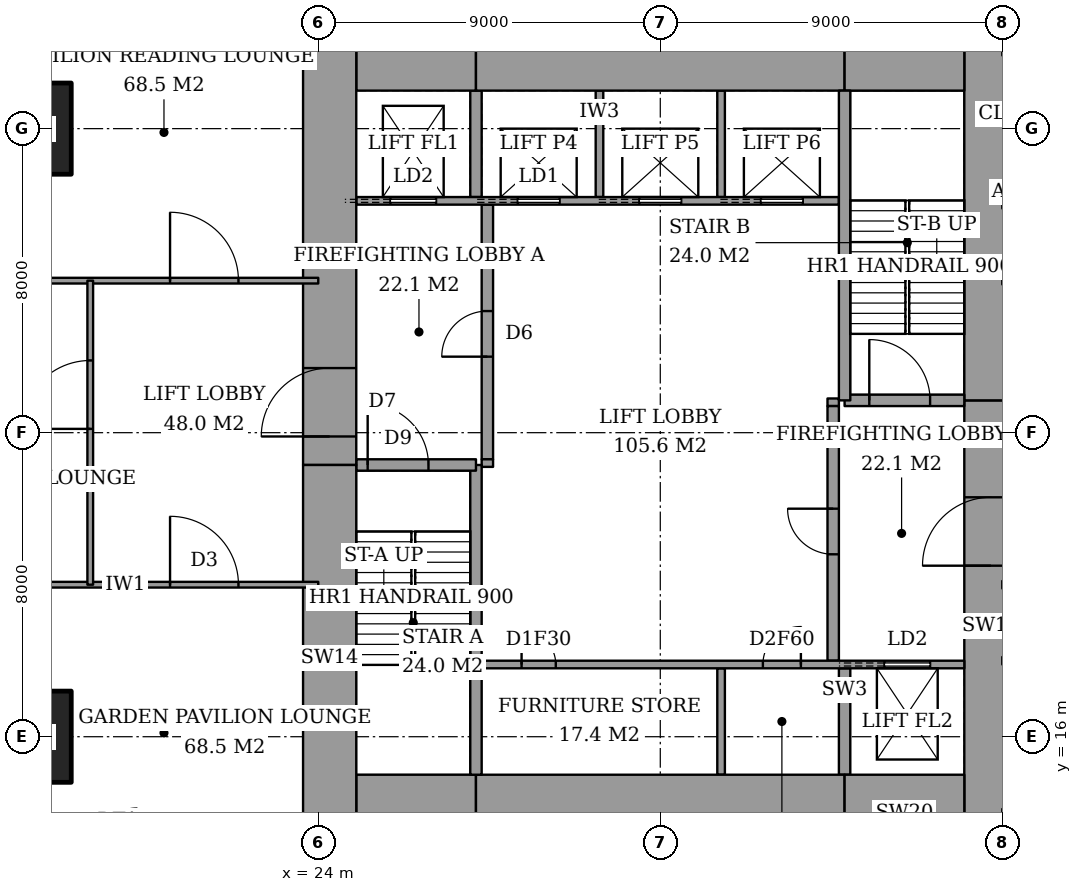
"""IFC4 building model, lengths in metres.
Left out: names, types, materials, properties, quantities, classifications, styles, units other than length and angle.
Written with IfcOpenShell. Run it as: python <this file> out.ifc"""

import sys

from ifc_helpers import new_model, si_unit, direction, frame, frame_2d, origin, origin_2d, place, context, subcontext, project, spatial, rectangle, extrude, element, fill, save


model = new_model("IFC4")
c1 = context("Model", 3, precision=1e-05, world=origin(), true_north=direction((0.0, 1.0)))
c2 = subcontext(c1, "Body", "Model", "MODEL_VIEW")
j1 = project(units=[si_unit("LENGTHUNIT", "METRE"), si_unit("PLANEANGLEUNIT", "RADIAN")], contexts=[c1])
p1 = place(None, origin())
s1 = spatial("IfcSite", under=j1, at=p1, CompositionType="ELEMENT")
p2 = place(p1, origin())
s2 = spatial("IfcBuilding", under=s1, at=p2, CompositionType="ELEMENT")
p3 = place(p2, frame((0.0, 0.0, 225.4)))
s3 = spatial("IfcBuildingStorey", under=s2, at=p3, CompositionType="ELEMENT", Elevation=225.4)
for number, where, z_axis, x_axis in (
    (1, (16.0, 16.0, 0.0), (0.0, 0.0, 1.0), (1.0, 0.0, 0.0)),
    (2, (16.0, 32.0, 0.0), (0.0, 0.0, 1.0), (1.0, 0.0, 0.0)),
):
    element("IfcColumn", number, at=place(p3, frame(where, z_axis=z_axis, x_axis=x_axis)), inside=s3, PredefinedType="COLUMN", context=c2, shape_type="SweptSolid", body=[
        extrude(rectangle(XDim=3.0, YDim=2.4, at=origin_2d()), origin(), (0.0, 0.0, 1.0), 5.0),
    ])
p4 = place(p3, frame((25.0, 14.0, 0.0), z_axis=(0.0, 0.0, 1.0), x_axis=(1.0, 0.0, 0.0)))
e3 = element("IfcWall", 3, at=p4, inside=s3, PredefinedType="SHEAR", context=c2, shape_type="SweptSolid", body=[
    extrude(rectangle(XDim=3.15, YDim=2.0, at=frame_2d((1.575, 0.0))), origin(), (0.0, 0.0, 1.0), 5.0),
])
p5 = place(p3, frame((28.15, 14.0, 0.0), z_axis=(0.0, 0.0, 1.0), x_axis=(1.0, 0.0, 0.0)))
e4 = element("IfcWall", 4, at=p5, inside=s3, PredefinedType="SHEAR", context=c2, shape_type="SweptSolid", body=[
    extrude(rectangle(XDim=9.7, YDim=2.0, at=frame_2d((4.85, 0.0))), origin(), (0.0, 0.0, 1.0), 5.0),
])
for number, where, z_axis, x_axis in (
    (5, (37.85, 14.0, 0.0), (0.0, 0.0, 1.0), (1.0, 0.0, 0.0)),
    (6, (25.0, 34.0, 0.0), (0.0, 0.0, 1.0), (1.0, 0.0, 0.0)),
):
    element("IfcWall", number, at=place(p3, frame(where, z_axis=z_axis, x_axis=x_axis)), inside=s3, PredefinedType="SHEAR", context=c2, shape_type="SweptSolid", body=[
        extrude(rectangle(XDim=3.15, YDim=2.0, at=frame_2d((1.575, 0.0))), origin(), (0.0, 0.0, 1.0), 5.0),
    ])
p6 = place(p3, frame((28.15, 34.0, 0.0), z_axis=(0.0, 0.0, 1.0), x_axis=(1.0, 0.0, 0.0)))
e7 = element("IfcWall", 7, at=p6, inside=s3, PredefinedType="SHEAR", context=c2, shape_type="SweptSolid", body=[
    extrude(rectangle(XDim=9.7, YDim=2.0, at=frame_2d((4.85, 0.0))), origin(), (0.0, 0.0, 1.0), 5.0),
])
p7 = place(p3, frame((37.85, 34.0, 0.0), z_axis=(0.0, 0.0, 1.0), x_axis=(1.0, 0.0, 0.0)))
e8 = element("IfcWall", 8, at=p7, inside=s3, PredefinedType="SHEAR", context=c2, shape_type="SweptSolid", body=[
    extrude(rectangle(XDim=3.15, YDim=2.0, at=frame_2d((1.575, 0.0))), origin(), (0.0, 0.0, 1.0), 5.0),
])
p8 = place(p3, frame((24.3, 13.0, 0.0), z_axis=(0.0, 0.0, 1.0), x_axis=(0.0, 1.0, 0.0)))
e9 = element("IfcWall", 9, at=p8, inside=s3, PredefinedType="SHEAR", context=c2, shape_type="SweptSolid", body=[
    extrude(rectangle(XDim=10.15, YDim=1.4, at=frame_2d((5.075, 0.0))), origin(), (0.0, 0.0, 1.0), 5.0),
])
p9 = place(p3, frame((24.3, 23.15, 0.0), z_axis=(0.0, 0.0, 1.0), x_axis=(0.0, 1.0, 0.0)))
e10 = element("IfcWall", 10, at=p9, inside=s3, PredefinedType="SHEAR", context=c2, shape_type="SweptSolid", body=[
    extrude(rectangle(XDim=11.85, YDim=1.4, at=frame_2d((5.925, 0.0))), origin(), (0.0, 0.0, 1.0), 5.0),
])
p10 = place(p9, frame((0.75, 0.0, 0.0)))
e11 = element("IfcOpeningElement", 11, at=p10, cuts=e10, PredefinedType="OPENING", context=c2, shape_type="SweptSolid", body=[
    extrude(rectangle(XDim=1.8, YDim=2.4, at=frame_2d((0.9, 1.2))), frame((0.0, 0.71, 0.0), z_axis=(0.0, -1.0, 0.0), x_axis=(1.0, 0.0, 0.0)), (0.0, 0.0, 1.0), 1.42),
])
p11 = place(p3, frame((41.7, 13.0, 0.0), z_axis=(0.0, 0.0, 1.0), x_axis=(0.0, 1.0, 0.0)))
e12 = element("IfcWall", 12, at=p11, inside=s3, PredefinedType="SHEAR", context=c2, shape_type="SweptSolid", body=[
    extrude(rectangle(XDim=11.85, YDim=1.4, at=frame_2d((5.925, 0.0))), origin(), (0.0, 0.0, 1.0), 5.0),
])
p12 = place(p11, frame((7.5, 0.0, 0.0)))
e13 = element("IfcOpeningElement", 13, at=p12, cuts=e12, PredefinedType="OPENING", context=c2, shape_type="SweptSolid", body=[
    extrude(rectangle(XDim=1.8, YDim=2.4, at=frame_2d((0.9, 1.2))), frame((0.0, 0.71, 0.0), z_axis=(0.0, -1.0, 0.0), x_axis=(1.0, 0.0, 0.0)), (0.0, 0.0, 1.0), 1.42),
])
p13 = place(p3, frame((41.7, 24.85, 0.0), z_axis=(0.0, 0.0, 1.0), x_axis=(0.0, 1.0, 0.0)))
e14 = element("IfcWall", 14, at=p13, inside=s3, PredefinedType="SHEAR", context=c2, shape_type="SweptSolid", body=[
    extrude(rectangle(XDim=10.15, YDim=1.4, at=frame_2d((5.075, 0.0))), origin(), (0.0, 0.0, 1.0), 5.0),
])
p14 = place(p3, frame((28.15, 15.0, 0.0), z_axis=(0.0, 0.0, 1.0), x_axis=(0.0, 1.0, 0.0)))
e15 = element("IfcWall", 15, at=p14, inside=s3, PredefinedType="SHEAR", context=c2, shape_type="SweptSolid", body=[
    extrude(rectangle(XDim=8.15, YDim=0.3, at=frame_2d((4.075, 0.0))), origin(), (0.0, 0.0, 1.0), 5.0),
])
p15 = place(p3, frame((25.0, 23.15, 0.0), z_axis=(0.0, 0.0, 1.0), x_axis=(1.0, 0.0, 0.0)))
e16 = element("IfcWall", 16, at=p15, inside=s3, PredefinedType="SHEAR", context=c2, shape_type="SweptSolid", body=[
    extrude(rectangle(XDim=3.15, YDim=0.3, at=frame_2d((1.575, 0.0))), origin(), (0.0, 0.0, 1.0), 5.0),
])
p16 = place(p15, frame((0.3, 0.0, 0.0)))
e17 = element("IfcOpeningElement", 17, at=p16, cuts=e16, PredefinedType="OPENING", context=c2, shape_type="SweptSolid", body=[
    extrude(rectangle(XDim=1.6, YDim=2.1, at=frame_2d((0.8, 1.05))), frame((0.0, 0.16, 0.0), z_axis=(0.0, -1.0, 0.0), x_axis=(1.0, 0.0, 0.0)), (0.0, 0.0, 1.0), 0.32),
])
p17 = place(p3, frame((37.85, 24.85, 0.0), z_axis=(0.0, 0.0, 1.0), x_axis=(0.0, 1.0, 0.0)))
e18 = element("IfcWall", 18, at=p17, inside=s3, PredefinedType="SHEAR", context=c2, shape_type="SweptSolid", body=[
    extrude(rectangle(XDim=8.15, YDim=0.3, at=frame_2d((4.075, 0.0))), origin(), (0.0, 0.0, 1.0), 5.0),
])
p18 = place(p3, frame((37.85, 24.85, 0.0), z_axis=(0.0, 0.0, 1.0), x_axis=(1.0, 0.0, 0.0)))
e19 = element("IfcWall", 19, at=p18, inside=s3, PredefinedType="SHEAR", context=c2, shape_type="SweptSolid", body=[
    extrude(rectangle(XDim=3.15, YDim=0.3, at=frame_2d((1.575, 0.0))), origin(), (0.0, 0.0, 1.0), 5.0),
])
p19 = place(p18, frame((0.65, 0.0, 0.0)))
e20 = element("IfcOpeningElement", 20, at=p19, cuts=e19, PredefinedType="OPENING", context=c2, shape_type="SweptSolid", body=[
    extrude(rectangle(XDim=1.6, YDim=2.1, at=frame_2d((0.8, 1.05))), frame((0.0, 0.16, 0.0), z_axis=(0.0, -1.0, 0.0), x_axis=(1.0, 0.0, 0.0)), (0.0, 0.0, 1.0), 0.32),
])
p20 = place(p3, frame((28.45, 23.3, 0.0), z_axis=(0.0, 0.0, 1.0), x_axis=(0.0, 1.0, 0.0)))
e21 = element("IfcWall", 21, at=p20, inside=s3, PredefinedType="PARTITIONING", context=c2, shape_type="SweptSolid", body=[
    extrude(rectangle(XDim=6.7, YDim=0.3, at=frame_2d((3.35, 0.0))), origin(), (0.0, 0.0, 1.0), 5.0),
])
p21 = place(p20, frame((2.7, 0.0, 0.0)))
e22 = element("IfcOpeningElement", 22, at=p21, cuts=e21, PredefinedType="OPENING", context=c2, shape_type="SweptSolid", body=[
    extrude(rectangle(XDim=1.2, YDim=2.1, at=frame_2d((0.6, 1.05))), frame((0.0, 0.16, 0.0), z_axis=(0.0, -1.0, 0.0), x_axis=(1.0, 0.0, 0.0)), (0.0, 0.0, 1.0), 0.32),
])
p22 = place(p3, frame((37.55, 18.0, 0.0), z_axis=(0.0, 0.0, 1.0), x_axis=(0.0, 1.0, 0.0)))
e23 = element("IfcWall", 23, at=p22, inside=s3, PredefinedType="PARTITIONING", context=c2, shape_type="SweptSolid", body=[
    extrude(rectangle(XDim=6.7, YDim=0.3, at=frame_2d((3.35, 0.0))), origin(), (0.0, 0.0, 1.0), 5.0),
])
p23 = place(p22, frame((2.8, 0.0, 0.0)))
e24 = element("IfcOpeningElement", 24, at=p23, cuts=e23, PredefinedType="OPENING", context=c2, shape_type="SweptSolid", body=[
    extrude(rectangle(XDim=1.2, YDim=2.1, at=frame_2d((0.6, 1.05))), frame((0.0, 0.16, 0.0), z_axis=(0.0, -1.0, 0.0), x_axis=(1.0, 0.0, 0.0)), (0.0, 0.0, 1.0), 0.32),
])
p24 = place(p3, frame((13.85, 20.0, 0.0), z_axis=(0.0, 0.0, 1.0), x_axis=(1.0, 0.0, 0.0)))
e25 = element("IfcWall", 25, at=p24, inside=s3, PredefinedType="PARTITIONING", context=c2, shape_type="SweptSolid", body=[
    extrude(rectangle(XDim=10.15, YDim=0.15, at=frame_2d((5.075, 0.0))), origin(), (0.0, 0.0, 1.0), 4.75),
])
p25 = place(p24, frame((6.25, 0.0, 0.0)))
e26 = element("IfcOpeningElement", 26, at=p25, cuts=e25, PredefinedType="OPENING", context=c2, shape_type="SweptSolid", body=[
    extrude(rectangle(XDim=1.8, YDim=2.1, at=frame_2d((0.9, 1.05))), frame((0.0, 0.085, 0.0), z_axis=(0.0, -1.0, 0.0), x_axis=(1.0, 0.0, 0.0)), (0.0, 0.0, 1.0), 0.17),
])
p26 = place(p3, frame((13.85, 28.0, 0.0), z_axis=(0.0, 0.0, 1.0), x_axis=(1.0, 0.0, 0.0)))
e27 = element("IfcWall", 27, at=p26, inside=s3, PredefinedType="PARTITIONING", context=c2, shape_type="SweptSolid", body=[
    extrude(rectangle(XDim=10.15, YDim=0.15, at=frame_2d((5.075, 0.0))), origin(), (0.0, 0.0, 1.0), 4.75),
])
p27 = place(p26, frame((6.25, 0.0, 0.0)))
e28 = element("IfcOpeningElement", 28, at=p27, cuts=e27, PredefinedType="OPENING", context=c2, shape_type="SweptSolid", body=[
    extrude(rectangle(XDim=1.8, YDim=2.1, at=frame_2d((0.9, 1.05))), frame((0.0, 0.085, 0.0), z_axis=(0.0, -1.0, 0.0), x_axis=(1.0, 0.0, 0.0)), (0.0, 0.0, 1.0), 0.17),
])
p28 = place(p3, frame((18.0, 20.0, 0.0), z_axis=(0.0, 0.0, 1.0), x_axis=(0.0, 1.0, 0.0)))
e29 = element("IfcWall", 29, at=p28, inside=s3, PredefinedType="PARTITIONING", context=c2, shape_type="SweptSolid", body=[
    extrude(rectangle(XDim=8.0, YDim=0.15, at=frame_2d((4.0, 0.0))), origin(), (0.0, 0.0, 1.0), 4.75),
])
p29 = place(p28, frame((4.1, 0.0, 0.0)))
e30 = element("IfcOpeningElement", 30, at=p29, cuts=e29, PredefinedType="OPENING", context=c2, shape_type="SweptSolid", body=[
    extrude(rectangle(XDim=1.8, YDim=2.1, at=frame_2d((0.9, 1.05))), frame((0.0, 0.085, 0.0), z_axis=(0.0, -1.0, 0.0), x_axis=(1.0, 0.0, 0.0)), (0.0, 0.0, 1.0), 0.17),
])
p30 = place(p3, frame((28.3, 17.9, 0.0), z_axis=(0.0, 0.0, 1.0), x_axis=(1.0, 0.0, 0.0)))
e31 = element("IfcWall", 31, at=p30, inside=s3, PredefinedType="PARTITIONING", context=c2, shape_type="SweptSolid", body=[
    extrude(rectangle(XDim=12.7, YDim=0.2, at=frame_2d((6.35, 0.0))), origin(), (0.0, 0.0, 1.0), 5.0),
])
p31 = place(p30, frame((1.05, 0.0, 0.0)))
e32 = element("IfcOpeningElement", 32, at=p31, cuts=e31, PredefinedType="OPENING", context=c2, shape_type="SweptSolid", body=[
    extrude(rectangle(XDim=0.9, YDim=2.1, at=frame_2d((0.45, 1.05))), frame((0.0, 0.11, 0.0), z_axis=(0.0, -1.0, 0.0), x_axis=(1.0, 0.0, 0.0)), (0.0, 0.0, 1.0), 0.22),
])
p32 = place(p30, frame((7.4, 0.0, 0.0)))
e33 = element("IfcOpeningElement", 33, at=p32, cuts=e31, PredefinedType="OPENING", context=c2, shape_type="SweptSolid", body=[
    extrude(rectangle(XDim=1.0, YDim=2.1, at=frame_2d((0.5, 1.05))), frame((0.0, 0.11, 0.0), z_axis=(0.0, -1.0, 0.0), x_axis=(1.0, 0.0, 0.0)), (0.0, 0.0, 1.0), 0.22),
])
p33 = place(p30, frame((10.6, 0.0, 0.0)))
e34 = element("IfcOpeningElement", 34, at=p33, cuts=e31, PredefinedType="OPENING", context=c2, shape_type="SweptSolid", body=[
    extrude(rectangle(XDim=1.2, YDim=2.1, at=frame_2d((0.6, 1.05))), frame((0.0, 0.11, 0.0), z_axis=(0.0, -1.0, 0.0), x_axis=(1.0, 0.0, 0.0)), (0.0, 0.0, 1.0), 0.22),
])
p34 = place(p3, frame((25.0, 30.1, 0.0), z_axis=(0.0, 0.0, 1.0), x_axis=(1.0, 0.0, 0.0)))
e35 = element("IfcWall", 35, at=p34, inside=s3, PredefinedType="PARTITIONING", context=c2, shape_type="SweptSolid", body=[
    extrude(rectangle(XDim=12.7, YDim=0.2, at=frame_2d((6.35, 0.0))), origin(), (0.0, 0.0, 1.0), 5.0),
])
p35 = place(p34, frame((4.25, 0.0, 0.0)))
e36 = element("IfcOpeningElement", 36, at=p35, cuts=e35, PredefinedType="OPENING", context=c2, shape_type="SweptSolid", body=[
    extrude(rectangle(XDim=1.1, YDim=2.1, at=frame_2d((0.55, 1.05))), frame((0.0, 0.11, 0.0), z_axis=(0.0, -1.0, 0.0), x_axis=(1.0, 0.0, 0.0)), (0.0, 0.0, 1.0), 0.22),
])
p36 = place(p34, frame((7.45, 0.0, 0.0)))
e37 = element("IfcOpeningElement", 37, at=p36, cuts=e35, PredefinedType="OPENING", context=c2, shape_type="SweptSolid", body=[
    extrude(rectangle(XDim=1.1, YDim=2.1, at=frame_2d((0.55, 1.05))), frame((0.0, 0.11, 0.0), z_axis=(0.0, -1.0, 0.0), x_axis=(1.0, 0.0, 0.0)), (0.0, 0.0, 1.0), 0.22),
])
p37 = place(p34, frame((10.65, 0.0, 0.0)))
e38 = element("IfcOpeningElement", 38, at=p37, cuts=e35, PredefinedType="OPENING", context=c2, shape_type="SweptSolid", body=[
    extrude(rectangle(XDim=1.1, YDim=2.1, at=frame_2d((0.55, 1.05))), frame((0.0, 0.11, 0.0), z_axis=(0.0, -1.0, 0.0), x_axis=(1.0, 0.0, 0.0)), (0.0, 0.0, 1.0), 0.22),
])
p38 = place(p34, frame((0.9, 0.0, 0.0)))
e39 = element("IfcOpeningElement", 39, at=p38, cuts=e35, PredefinedType="OPENING", context=c2, shape_type="SweptSolid", body=[
    extrude(rectangle(XDim=1.2, YDim=2.1, at=frame_2d((0.6, 1.05))), frame((0.0, 0.11, 0.0), z_axis=(0.0, -1.0, 0.0), x_axis=(1.0, 0.0, 0.0)), (0.0, 0.0, 1.0), 0.22),
])
p39 = place(p3, frame((34.6, 15.0, 0.0), z_axis=(0.0, 0.0, 1.0), x_axis=(0.0, 1.0, 0.0)))
e40 = element("IfcWall", 40, at=p39, inside=s3, PredefinedType="PARTITIONING", context=c2, shape_type="SweptSolid", body=[
    extrude(rectangle(XDim=2.8, YDim=0.2, at=frame_2d((1.4, 0.0))), origin(), (0.0, 0.0, 1.0), 5.0),
])
p40 = place(p3, frame((37.85, 15.0, 0.0), z_axis=(0.0, 0.0, 1.0), x_axis=(0.0, 1.0, 0.0)))
e41 = element("IfcWall", 41, at=p40, inside=s3, PredefinedType="SHEAR", context=c2, shape_type="SweptSolid", body=[
    extrude(rectangle(XDim=2.8, YDim=0.3, at=frame_2d((1.4, 0.0))), origin(), (0.0, 0.0, 1.0), 5.0),
])
for number, where, z_axis, x_axis in (
    (42, (31.4, 30.2, 0.0), (0.0, 0.0, 1.0), (0.0, 1.0, 0.0)),
    (43, (34.6, 30.2, 0.0), (0.0, 0.0, 1.0), (0.0, 1.0, 0.0)),
):
    element("IfcWall", number, at=place(p3, frame(where, z_axis=z_axis, x_axis=x_axis)), inside=s3, PredefinedType="PARTITIONING", context=c2, shape_type="SweptSolid", body=[
        extrude(rectangle(XDim=2.8, YDim=0.2, at=frame_2d((1.4, 0.0))), origin(), (0.0, 0.0, 1.0), 5.0),
    ])
p41 = place(p3, frame((28.15, 30.2, 0.0), z_axis=(0.0, 0.0, 1.0), x_axis=(0.0, 1.0, 0.0)))
e44 = element("IfcWall", 44, at=p41, inside=s3, PredefinedType="SHEAR", context=c2, shape_type="SweptSolid", body=[
    extrude(rectangle(XDim=2.8, YDim=0.3, at=frame_2d((1.4, 0.0))), origin(), (0.0, 0.0, 1.0), 5.0),
])
for number, where, z_axis, x_axis in (
    (45, (28.3, 23.2, 0.0), (0.0, 0.0, 1.0), (1.0, 0.0, 0.0)),
    (46, (37.4, 24.8, 0.0), (0.0, 0.0, 1.0), (1.0, 0.0, 0.0)),
):
    element("IfcWall", number, at=place(p3, frame(where, z_axis=z_axis, x_axis=x_axis)), inside=s3, PredefinedType="PARTITIONING", context=c2, shape_type="SweptSolid", body=[
        extrude(rectangle(XDim=0.3, YDim=0.2, at=frame_2d((0.15, 0.0))), origin(), (0.0, 0.0, 1.0), 5.0),
    ])
p42 = place(p25, origin())
e47 = element("IfcDoor", 47, at=p42, inside=s3, OperationType="DOUBLE_DOOR_DOUBLE_SWING", PredefinedType="DOOR", context=c2, shape_type="SweptSolid", body=[
    extrude(rectangle(XDim=1.8, YDim=2.1, at=frame_2d((0.9, 1.05))), frame((0.0, 0.025, 0.0), z_axis=(0.0, -1.0, 0.0), x_axis=(1.0, 0.0, 0.0)), (0.0, 0.0, 1.0), 0.05),
])
fill(e26, e47)
p43 = place(p29, origin())
e48 = element("IfcDoor", 48, at=p43, inside=s3, OperationType="DOUBLE_DOOR_DOUBLE_SWING", PredefinedType="DOOR", context=c2, shape_type="SweptSolid", body=[
    extrude(rectangle(XDim=1.8, YDim=2.1, at=frame_2d((0.9, 1.05))), frame((0.0, 0.025, 0.0), z_axis=(0.0, -1.0, 0.0), x_axis=(1.0, 0.0, 0.0)), (0.0, 0.0, 1.0), 0.05),
])
fill(e30, e48)
p44 = place(p27, origin())
e49 = element("IfcDoor", 49, at=p44, inside=s3, OperationType="DOUBLE_DOOR_DOUBLE_SWING", PredefinedType="DOOR", context=c2, shape_type="SweptSolid", body=[
    extrude(rectangle(XDim=1.8, YDim=2.1, at=frame_2d((0.9, 1.05))), frame((0.0, 0.025, 0.0), z_axis=(0.0, -1.0, 0.0), x_axis=(1.0, 0.0, 0.0)), (0.0, 0.0, 1.0), 0.05),
])
fill(e28, e49)
p45 = place(p16, origin())
e50 = element("IfcDoor", 50, at=p45, inside=s3, OperationType="DOUBLE_DOOR_SINGLE_SWING", PredefinedType="DOOR", context=c2, shape_type="SweptSolid", body=[
    extrude(rectangle(XDim=1.6, YDim=2.1, at=frame_2d((0.8, 1.05))), frame((0.0, 0.025, 0.0), z_axis=(0.0, -1.0, 0.0), x_axis=(1.0, 0.0, 0.0)), (0.0, 0.0, 1.0), 0.05),
])
fill(e17, e50)
p46 = place(p19, origin())
e51 = element("IfcDoor", 51, at=p46, inside=s3, OperationType="DOUBLE_DOOR_SINGLE_SWING", PredefinedType="DOOR", context=c2, shape_type="SweptSolid", body=[
    extrude(rectangle(XDim=1.6, YDim=2.1, at=frame_2d((0.8, 1.05))), frame((0.0, 0.025, 0.0), z_axis=(0.0, -1.0, 0.0), x_axis=(1.0, 0.0, 0.0)), (0.0, 0.0, 1.0), 0.05),
])
fill(e20, e51)
p47 = place(p21, origin())
e52 = element("IfcDoor", 52, at=p47, inside=s3, OperationType="SINGLE_SWING_RIGHT", PredefinedType="DOOR", context=c2, shape_type="SweptSolid", body=[
    extrude(rectangle(XDim=1.2, YDim=2.1, at=frame_2d((0.6, 1.05))), frame((0.0, 0.025, 0.0), z_axis=(0.0, -1.0, 0.0), x_axis=(1.0, 0.0, 0.0)), (0.0, 0.0, 1.0), 0.05),
])
fill(e22, e52)
p48 = place(p23, origin())
e53 = element("IfcDoor", 53, at=p48, inside=s3, OperationType="SINGLE_SWING_LEFT", PredefinedType="DOOR", context=c2, shape_type="SweptSolid", body=[
    extrude(rectangle(XDim=1.2, YDim=2.1, at=frame_2d((0.6, 1.05))), frame((0.0, 0.025, 0.0), z_axis=(0.0, -1.0, 0.0), x_axis=(1.0, 0.0, 0.0)), (0.0, 0.0, 1.0), 0.05),
])
fill(e24, e53)
p49 = place(p10, origin())
e54 = element("IfcDoor", 54, at=p49, inside=s3, OperationType="DOUBLE_DOOR_DOUBLE_SWING", PredefinedType="DOOR", context=c2, shape_type="SweptSolid", body=[
    extrude(rectangle(XDim=1.8, YDim=2.4, at=frame_2d((0.9, 1.2))), frame((0.0, 0.025, 0.0), z_axis=(0.0, -1.0, 0.0), x_axis=(1.0, 0.0, 0.0)), (0.0, 0.0, 1.0), 0.05),
])
fill(e11, e54)
p50 = place(p12, origin())
e55 = element("IfcDoor", 55, at=p50, inside=s3, OperationType="DOUBLE_DOOR_DOUBLE_SWING", PredefinedType="DOOR", context=c2, shape_type="SweptSolid", body=[
    extrude(rectangle(XDim=1.8, YDim=2.4, at=frame_2d((0.9, 1.2))), frame((0.0, 0.025, 0.0), z_axis=(0.0, -1.0, 0.0), x_axis=(1.0, 0.0, 0.0)), (0.0, 0.0, 1.0), 0.05),
])
fill(e13, e55)
p51 = place(p31, origin())
e56 = element("IfcDoor", 56, at=p51, inside=s3, OperationType="SINGLE_SWING_RIGHT", PredefinedType="DOOR", context=c2, shape_type="SweptSolid", body=[
    extrude(rectangle(XDim=0.9, YDim=2.1, at=frame_2d((0.45, 1.05))), frame((0.0, 0.025, 0.0), z_axis=(0.0, -1.0, 0.0), x_axis=(1.0, 0.0, 0.0)), (0.0, 0.0, 1.0), 0.05),
])
fill(e32, e56)
p52 = place(p32, origin())
e57 = element("IfcDoor", 57, at=p52, inside=s3, OperationType="SINGLE_SWING_LEFT", PredefinedType="DOOR", context=c2, shape_type="SweptSolid", body=[
    extrude(rectangle(XDim=1.0, YDim=2.1, at=frame_2d((0.5, 1.05))), frame((0.0, 0.025, 0.0), z_axis=(0.0, -1.0, 0.0), x_axis=(1.0, 0.0, 0.0)), (0.0, 0.0, 1.0), 0.05),
])
fill(e33, e57)
p53 = place(p35, origin())
e58 = element("IfcDoor", 58, at=p53, inside=s3, OperationType="SLIDING_TO_LEFT", PredefinedType="DOOR", context=c2, shape_type="SweptSolid", body=[
    extrude(rectangle(XDim=1.1, YDim=2.1, at=frame_2d((0.55, 1.05))), frame((0.0, 0.025, 0.0), z_axis=(0.0, -1.0, 0.0), x_axis=(1.0, 0.0, 0.0)), (0.0, 0.0, 1.0), 0.05),
])
fill(e36, e58)
p54 = place(p36, origin())
e59 = element("IfcDoor", 59, at=p54, inside=s3, OperationType="SLIDING_TO_LEFT", PredefinedType="DOOR", context=c2, shape_type="SweptSolid", body=[
    extrude(rectangle(XDim=1.1, YDim=2.1, at=frame_2d((0.55, 1.05))), frame((0.0, 0.025, 0.0), z_axis=(0.0, -1.0, 0.0), x_axis=(1.0, 0.0, 0.0)), (0.0, 0.0, 1.0), 0.05),
])
fill(e37, e59)
p55 = place(p37, origin())
e60 = element("IfcDoor", 60, at=p55, inside=s3, OperationType="SLIDING_TO_LEFT", PredefinedType="DOOR", context=c2, shape_type="SweptSolid", body=[
    extrude(rectangle(XDim=1.1, YDim=2.1, at=frame_2d((0.55, 1.05))), frame((0.0, 0.025, 0.0), z_axis=(0.0, -1.0, 0.0), x_axis=(1.0, 0.0, 0.0)), (0.0, 0.0, 1.0), 0.05),
])
fill(e38, e60)
p56 = place(p38, origin())
e61 = element("IfcDoor", 61, at=p56, inside=s3, OperationType="SLIDING_TO_LEFT", PredefinedType="DOOR", context=c2, shape_type="SweptSolid", body=[
    extrude(rectangle(XDim=1.2, YDim=2.1, at=frame_2d((0.6, 1.05))), frame((0.0, 0.025, 0.0), z_axis=(0.0, -1.0, 0.0), x_axis=(1.0, 0.0, 0.0)), (0.0, 0.0, 1.0), 0.05),
])
fill(e39, e61)
p57 = place(p33, origin())
e62 = element("IfcDoor", 62, at=p57, inside=s3, OperationType="SLIDING_TO_LEFT", PredefinedType="DOOR", context=c2, shape_type="SweptSolid", body=[
    extrude(rectangle(XDim=1.2, YDim=2.1, at=frame_2d((0.6, 1.05))), frame((0.0, 0.025, 0.0), z_axis=(0.0, -1.0, 0.0), x_axis=(1.0, 0.0, 0.0)), (0.0, 0.0, 1.0), 0.05),
])
fill(e34, e62)
save(model, sys.argv[1])
